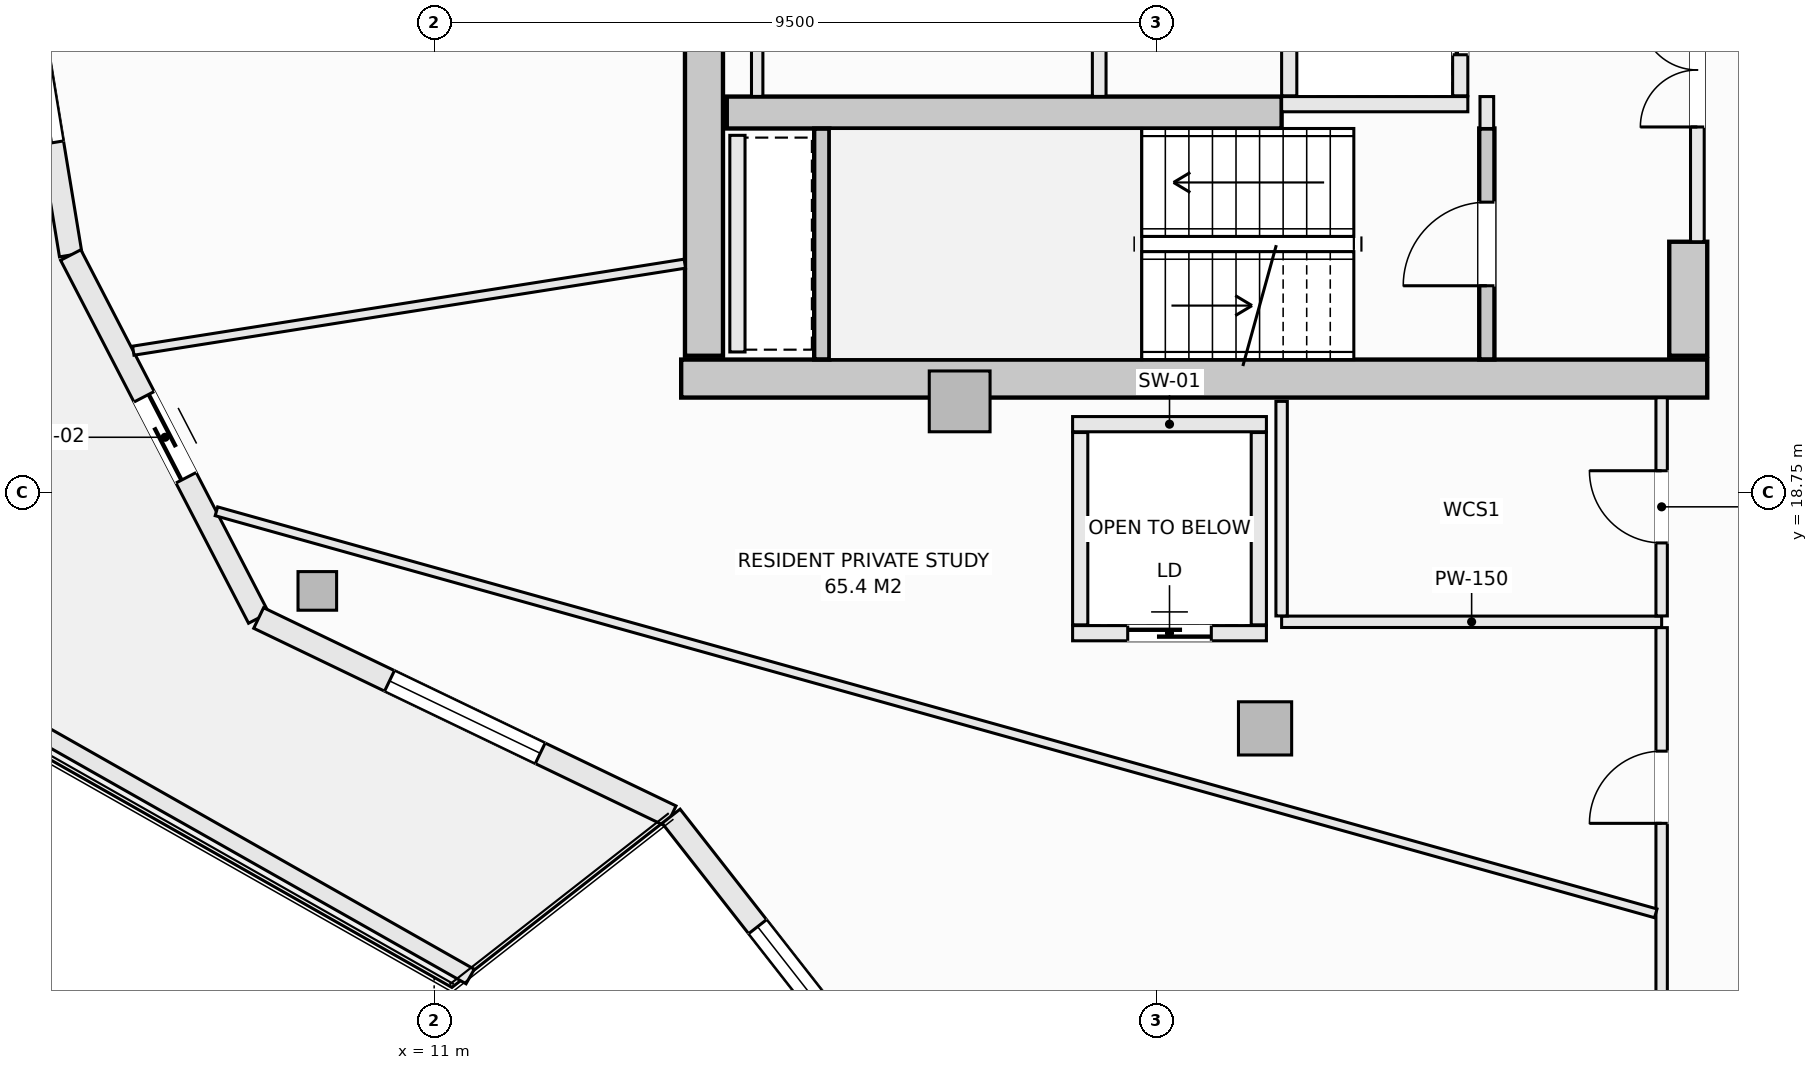
"""IFC4 building model, lengths in metres.
Left out: names, types, materials, properties, quantities, classifications, styles, units other than length and angle.
Written with IfcOpenShell. Run it as: python <this file> out.ifc"""

import sys

from ifc_helpers import new_model, si_unit, direction, frame, frame_2d, origin, origin_2d, place, context, subcontext, project, spatial, rectangle, hollow_rectangle, extrude, element, fill, save


model = new_model("IFC4")
c1 = context("Model", 3, precision=1e-05, world=origin(), true_north=direction((0.0, 1.0)))
c2 = subcontext(c1, "Body", "Model", "MODEL_VIEW")
j1 = project(units=[si_unit("LENGTHUNIT", "METRE"), si_unit("PLANEANGLEUNIT", "RADIAN")], contexts=[c1])
p1 = place(None, origin())
s1 = spatial("IfcSite", under=j1, at=p1, CompositionType="ELEMENT")
p2 = place(p1, origin())
s2 = spatial("IfcBuilding", under=s1, at=p2, CompositionType="ELEMENT")
p3 = place(p2, frame((0.0, 0.0, 222.8)))
s3 = spatial("IfcBuildingStorey", under=s2, at=p3, CompositionType="ELEMENT", Elevation=222.8)
p4 = place(p3, frame((14.25, 20.25, -0.27), z_axis=(0.0, 0.0, 1.0), x_axis=(1.0, 0.0, 0.0)))
e1 = element("IfcWall", 1, at=p4, inside=s3, PredefinedType="SHEAR", context=c2, shape_type="SweptSolid", body=[
    extrude(rectangle(XDim=13.5, YDim=0.5, at=frame_2d((6.75, 0.0))), origin(), (0.0, 0.0, 1.0), 3.3),
])
p5 = place(p3, frame((14.55, 20.55, -0.27), z_axis=(0.0, 0.0, 1.0), x_axis=(0.0, 1.0, 0.0)))
e2 = element("IfcWall", 2, at=p5, inside=s3, PredefinedType="SHEAR", context=c2, shape_type="SweptSolid", body=[
    extrude(rectangle(XDim=12.9, YDim=0.5, at=frame_2d((6.45, 0.0))), origin(), (0.0, 0.0, 1.0), 3.3),
])
p6 = place(p3, frame((27.5, 20.55, -0.27), z_axis=(0.0, 0.0, 1.0), x_axis=(0.0, 1.0, 0.0)))
e3 = element("IfcWall", 3, at=p6, inside=s3, PredefinedType="SHEAR", context=c2, shape_type="SweptSolid", body=[
    extrude(rectangle(XDim=1.5, YDim=0.5, at=frame_2d((0.75, 0.0))), origin(), (0.0, 0.0, 1.0), 3.3),
])
p7 = place(p3, frame((14.85, 23.75, -0.27), z_axis=(0.0, 0.0, 1.0), x_axis=(1.0, 0.0, 0.0)))
e4 = element("IfcWall", 4, at=p7, inside=s3, PredefinedType="SHEAR", context=c2, shape_type="SweptSolid", body=[
    extrude(rectangle(XDim=7.3, YDim=0.42, at=frame_2d((3.65, 0.0))), origin(), (0.0, 0.0, 1.0), 3.3),
])
p8 = place(p3, frame((9.463, 17.456, -0.27), z_axis=(0.0, 0.0, 1.0), x_axis=(1.0, 0.0, 0.0)))
e5 = element("IfcColumn", 5, at=p8, inside=s3, PredefinedType="COLUMN", context=c2, shape_type="SweptSolid", body=[
    extrude(hollow_rectangle(XDim=0.508, YDim=0.508, WallThickness=0.019, at=origin_2d()), origin(), (0.0, 0.0, 1.0), 3.3),
])
p9 = place(p3, frame((21.932, 15.648, -0.27), z_axis=(0.0, 0.0, 1.0), x_axis=(1.0, 0.0, 0.0)))
e6 = element("IfcColumn", 6, at=p9, inside=s3, PredefinedType="COLUMN", context=c2, shape_type="SweptSolid", body=[
    extrude(rectangle(XDim=0.7, YDim=0.7, at=origin_2d()), origin(), (0.0, 0.0, 1.0), 3.3),
])
p10 = place(p3, frame((17.914, 19.95, -0.27), z_axis=(0.0, 0.0, 1.0), x_axis=(1.0, 0.0, 0.0)))
e7 = element("IfcColumn", 7, at=p10, inside=s3, PredefinedType="PILASTER", context=c2, shape_type="SweptSolid", body=[
    extrude(rectangle(XDim=0.8, YDim=0.8, at=origin_2d()), origin(), (0.0, 0.0, 1.0), 3.3),
])
p11 = place(p3, frame((5.375, 27.0, 0.0), z_axis=(0.0, 0.0, 1.0), x_axis=(0.16237087798, -0.986729799886, 0.0)))
e8 = element("IfcWall", 8, at=p11, inside=s3, PredefinedType="SOLIDWALL", context=c2, shape_type="SweptSolid", body=[
    extrude(rectangle(XDim=5.193, YDim=0.3, at=frame_2d((2.597, 0.0))), origin(), (0.0, 0.0, 1.0), 2.605),
])
p12 = place(p11, frame((1.497, 0.0, 0.72)))
e9 = element("IfcOpeningElement", 9, at=p12, cuts=e8, PredefinedType="OPENING", context=c2, shape_type="SweptSolid", body=[
    extrude(rectangle(XDim=2.2, YDim=1.65, at=frame_2d((1.1, 0.825))), frame((0.0, 0.16, 0.0), z_axis=(0.0, -1.0, 0.0), x_axis=(1.0, 0.0, 0.0)), (0.0, 0.0, 1.0), 0.32),
])
p13 = place(p3, frame((6.218, 21.875, 0.0), z_axis=(0.0, 0.0, 1.0), x_axis=(0.459808219482, -0.888018243786, 0.0)))
e10 = element("IfcWall", 10, at=p13, inside=s3, PredefinedType="SOLIDWALL", context=c2, shape_type="SweptSolid", body=[
    extrude(rectangle(XDim=5.378, YDim=0.3, at=frame_2d((2.689, 0.0))), origin(), (0.0, 0.0, 1.0), 2.605),
])
p14 = place(p13, frame((2.1, 0.0, 0.0)))
e11 = element("IfcOpeningElement", 11, at=p14, cuts=e10, PredefinedType="OPENING", context=c2, shape_type="SweptSolid", body=[
    extrude(rectangle(XDim=1.2, YDim=2.2, at=frame_2d((0.6, 1.1))), frame((0.0, 0.16, 0.0), z_axis=(0.0, -1.0, 0.0), x_axis=(1.0, 0.0, 0.0)), (0.0, 0.0, 1.0), 0.32),
])
p15 = place(p3, frame((8.691, 17.1, 0.0), z_axis=(0.0, 0.0, 1.0), x_axis=(0.901348331142, -0.433094892545, 0.0)))
e12 = element("IfcWall", 12, at=p15, inside=s3, PredefinedType="SOLIDWALL", context=c2, shape_type="SweptSolid", body=[
    extrude(rectangle(XDim=6.021, YDim=0.3, at=frame_2d((3.01, 0.0))), origin(), (0.0, 0.0, 1.0), 2.605),
])
p16 = place(p15, frame((1.91, 0.0, 0.72)))
e13 = element("IfcOpeningElement", 13, at=p16, cuts=e12, PredefinedType="OPENING", context=c2, shape_type="SweptSolid", body=[
    extrude(rectangle(XDim=2.2, YDim=1.65, at=frame_2d((1.1, 0.825))), frame((0.0, 0.16, 0.0), z_axis=(0.0, -1.0, 0.0), x_axis=(1.0, 0.0, 0.0)), (0.0, 0.0, 1.0), 0.32),
])
p17 = place(p3, frame((14.117, 14.493, 0.0), z_axis=(0.0, 0.0, 1.0), x_axis=(0.616450126935, -0.787393955401, 0.0)))
e14 = element("IfcWall", 14, at=p17, inside=s3, PredefinedType="SOLIDWALL", context=c2, shape_type="SweptSolid", body=[
    extrude(rectangle(XDim=5.893, YDim=0.3, at=frame_2d((2.946, 0.0))), origin(), (0.0, 0.0, 1.0), 2.605),
])
p18 = place(p17, frame((1.846, 0.0, 0.72)))
e15 = element("IfcOpeningElement", 15, at=p18, cuts=e14, PredefinedType="OPENING", context=c2, shape_type="SweptSolid", body=[
    extrude(rectangle(XDim=2.2, YDim=1.65, at=frame_2d((1.1, 0.825))), frame((0.0, 0.16, 0.0), z_axis=(0.0, -1.0, 0.0), x_axis=(1.0, 0.0, 0.0)), (0.0, 0.0, 1.0), 0.32),
])
p19 = place(p3, frame((5.608, 15.709, 0.0), z_axis=(0.0, 0.0, 1.0), x_axis=(0.869860619267, -0.493297580623, 0.0)))
e16 = element("IfcWall", 16, at=p19, inside=s3, PredefinedType="PARAPET", context=c2, shape_type="SweptSolid", body=[
    extrude(rectangle(XDim=6.743, YDim=0.22, at=frame_2d((3.371, 0.0))), origin(), (0.0, 0.0, 1.0), 0.52),
])
p20 = place(p3, frame((24.85, 20.502, -0.27), z_axis=(0.0, 0.0, 1.0), x_axis=(0.0, 1.0, 0.0)))
e17 = element("IfcWall", 17, at=p20, inside=s3, PredefinedType="SHEAR", context=c2, shape_type="SweptSolid", body=[
    extrude(rectangle(XDim=3.038, YDim=0.2, at=frame_2d((1.519, 0.0))), origin(), (0.0, 0.0, 1.0), 3.3),
])
p21 = place(p20, frame((0.969, 0.0, 0.27)))
e18 = element("IfcOpeningElement", 18, at=p21, cuts=e17, PredefinedType="OPENING", context=c2, shape_type="SweptSolid", body=[
    extrude(rectangle(XDim=1.1, YDim=2.15, at=frame_2d((0.55, 1.075))), frame((0.0, 0.11, 0.0), z_axis=(0.0, -1.0, 0.0), x_axis=(1.0, 0.0, 0.0)), (0.0, 0.0, 1.0), 0.22),
])
p22 = place(p3, frame((16.1, 20.502, -0.27), z_axis=(0.0, 0.0, 1.0), x_axis=(0.0, 1.0, 0.0)))
e19 = element("IfcWall", 19, at=p22, inside=s3, PredefinedType="SHEAR", context=c2, shape_type="SweptSolid", body=[
    extrude(rectangle(XDim=3.036, YDim=0.2, at=frame_2d((1.518, 0.0))), origin(), (0.0, 0.0, 1.0), 3.3),
])
p23 = place(p3, frame((22.15, 23.86, 0.0), z_axis=(0.0, 0.0, 1.0), x_axis=(1.0, 0.0, 0.0)))
e20 = element("IfcWall", 20, at=p23, inside=s3, PredefinedType="SOLIDWALL", context=c2, shape_type="SweptSolid", body=[
    extrude(rectangle(XDim=2.45, YDim=0.2, at=frame_2d((1.225, 0.0))), origin(), (0.0, 0.0, 1.0), 3.03),
])
p24 = place(p3, frame((22.25, 23.97, 0.0), z_axis=(0.0, 0.0, 1.0), x_axis=(0.0, 1.0, 0.0)))
e21 = element("IfcWall", 21, at=p24, inside=s3, PredefinedType="SOLIDWALL", context=c2, shape_type="SweptSolid", body=[
    extrude(rectangle(XDim=2.18, YDim=0.2, at=frame_2d((1.09, 0.0))), origin(), (0.0, 0.0, 1.0), 3.03),
])
p25 = place(p3, frame((24.5, 23.97, 0.0), z_axis=(0.0, 0.0, 1.0), x_axis=(0.0, 1.0, 0.0)))
e22 = element("IfcWall", 22, at=p25, inside=s3, PredefinedType="SOLIDWALL", context=c2, shape_type="SweptSolid", body=[
    extrude(rectangle(XDim=2.18, YDim=0.2, at=frame_2d((1.09, 0.0))), origin(), (0.0, 0.0, 1.0), 3.03),
])
p26 = place(p25, frame((0.54, 0.0, 0.0)))
e23 = element("IfcOpeningElement", 23, at=p26, cuts=e22, PredefinedType="OPENING", context=c2, shape_type="SweptSolid", body=[
    extrude(rectangle(XDim=1.1, YDim=2.2, at=frame_2d((0.55, 1.1))), frame((0.0, 0.11, 0.0), z_axis=(0.0, -1.0, 0.0), x_axis=(1.0, 0.0, 0.0)), (0.0, 0.0, 1.0), 0.22),
])
p27 = place(p3, frame((19.4, 19.65, 0.0), z_axis=(0.0, 0.0, 1.0), x_axis=(1.0, 0.0, 0.0)))
e24 = element("IfcWall", 24, at=p27, inside=s3, PredefinedType="SOLIDWALL", context=c2, shape_type="SweptSolid", body=[
    extrude(rectangle(XDim=2.55, YDim=0.2, at=frame_2d((1.275, 0.0))), origin(), (0.0, 0.0, 1.0), 3.03),
])
p28 = place(p3, frame((19.4, 16.9, 0.0), z_axis=(0.0, 0.0, 1.0), x_axis=(1.0, 0.0, 0.0)))
e25 = element("IfcWall", 25, at=p28, inside=s3, PredefinedType="SOLIDWALL", context=c2, shape_type="SweptSolid", body=[
    extrude(rectangle(XDim=2.55, YDim=0.2, at=frame_2d((1.275, 0.0))), origin(), (0.0, 0.0, 1.0), 3.03),
])
p29 = place(p28, frame((0.725, 0.0, 0.0)))
e26 = element("IfcOpeningElement", 26, at=p29, cuts=e25, PredefinedType="OPENING", context=c2, shape_type="SweptSolid", body=[
    extrude(rectangle(XDim=1.1, YDim=2.2, at=frame_2d((0.55, 1.1))), frame((0.0, 0.11, 0.0), z_axis=(0.0, -1.0, 0.0), x_axis=(1.0, 0.0, 0.0)), (0.0, 0.0, 1.0), 0.22),
])
for number, where, z_axis, x_axis in (
    (27, (19.5, 17.01, 0.0), (0.0, 0.0, 1.0), (0.0, 1.0, 0.0)),
    (28, (21.85, 17.01, 0.0), (0.0, 0.0, 1.0), (0.0, 1.0, 0.0)),
):
    element("IfcWall", number, at=place(p3, frame(where, z_axis=z_axis, x_axis=x_axis)), inside=s3, PredefinedType="SOLIDWALL", context=c2, shape_type="SweptSolid", body=[
        extrude(rectangle(XDim=2.53, YDim=0.2, at=frame_2d((1.265, 0.0))), origin(), (0.0, 0.0, 1.0), 3.03),
    ])
p30 = place(p3, frame((14.99, 20.6, 0.0), z_axis=(0.0, 0.0, 1.0), x_axis=(0.0, 1.0, 0.0)))
e29 = element("IfcWall", 29, at=p30, inside=s3, PredefinedType="SOLIDWALL", context=c2, shape_type="SweptSolid", body=[
    extrude(rectangle(XDim=2.85, YDim=0.2, at=frame_2d((1.425, 0.0))), origin(), (0.0, 0.0, 1.0), 3.03),
])
p31 = place(p3, frame((24.85, 23.54, 0.0), z_axis=(0.0, 0.0, 1.0), x_axis=(0.0, 1.0, 0.0)))
e30 = element("IfcWall", 30, at=p31, inside=s3, PredefinedType="SOLIDWALL", context=c2, shape_type="SweptSolid", body=[
    extrude(rectangle(XDim=0.42, YDim=0.18, at=frame_2d((0.21, 0.0))), origin(), (0.0, 0.0, 1.0), 3.03),
])
p32 = place(p3, frame((27.62, 22.05, 0.0), z_axis=(0.0, 0.0, 1.0), x_axis=(0.0, 1.0, 0.0)))
e31 = element("IfcWall", 31, at=p32, inside=s3, PredefinedType="SOLIDWALL", context=c2, shape_type="SweptSolid", body=[
    extrude(rectangle(XDim=9.9, YDim=0.18, at=frame_2d((4.95, 0.0))), origin(), (0.0, 0.0, 1.0), 3.03),
])
p33 = place(p32, frame((4.475, 0.0, 0.0)))
e32 = element("IfcOpeningElement", 32, at=p33, cuts=e31, PredefinedType="OPENING", context=c2, shape_type="SweptSolid", body=[
    extrude(rectangle(XDim=0.95, YDim=2.1, at=frame_2d((0.475, 1.05))), frame((0.0, 0.1, 0.0), z_axis=(0.0, -1.0, 0.0), x_axis=(1.0, 0.0, 0.0)), (0.0, 0.0, 1.0), 0.2),
])
p34 = place(p32, frame((6.89, 0.0, 0.0)))
e33 = element("IfcOpeningElement", 33, at=p34, cuts=e31, PredefinedType="OPENING", context=c2, shape_type="SweptSolid", body=[
    extrude(rectangle(XDim=1.5, YDim=2.2, at=frame_2d((0.75, 1.1))), frame((0.0, 0.1, 0.0), z_axis=(0.0, -1.0, 0.0), x_axis=(1.0, 0.0, 0.0)), (0.0, 0.0, 1.0), 0.2),
])
p35 = place(p32, frame((1.51, 0.0, 0.0)))
e34 = element("IfcOpeningElement", 34, at=p35, cuts=e31, PredefinedType="OPENING", context=c2, shape_type="SweptSolid", body=[
    extrude(rectangle(XDim=1.5, YDim=2.2, at=frame_2d((0.75, 1.1))), frame((0.0, 0.1, 0.0), z_axis=(0.0, -1.0, 0.0), x_axis=(1.0, 0.0, 0.0)), (0.0, 0.0, 1.0), 0.2),
])
p36 = place(p3, frame((15.25, 23.962, 0.0), z_axis=(0.0, 0.0, 1.0), x_axis=(0.0, 1.0, 0.0)))
e35 = element("IfcWall", 35, at=p36, inside=s3, PredefinedType="PARTITIONING", context=c2, shape_type="SweptSolid", body=[
    extrude(rectangle(XDim=2.106, YDim=0.15, at=frame_2d((1.053, 0.0))), origin(), (0.0, 0.0, 1.0), 3.03),
])
p37 = place(p3, frame((19.75, 23.962, 0.0), z_axis=(0.0, 0.0, 1.0), x_axis=(0.0, 1.0, 0.0)))
e36 = element("IfcWall", 36, at=p37, inside=s3, PredefinedType="SOLIDWALL", context=c2, shape_type="SweptSolid", body=[
    extrude(rectangle(XDim=2.106, YDim=0.18, at=frame_2d((1.053, 0.0))), origin(), (0.0, 0.0, 1.0), 3.03),
])
p38 = place(p3, frame((22.15, 17.05, 0.0), z_axis=(0.0, 0.0, 1.0), x_axis=(1.0, 0.0, 0.0)))
e37 = element("IfcWall", 37, at=p38, inside=s3, PredefinedType="PARTITIONING", context=c2, shape_type="SweptSolid", body=[
    extrude(rectangle(XDim=5.0, YDim=0.15, at=frame_2d((2.5, 0.0))), origin(), (0.0, 0.0, 1.0), 3.03),
])
p39 = place(p3, frame((22.15, 17.127, 0.0), z_axis=(0.0, 0.0, 1.0), x_axis=(0.0, 1.0, 0.0)))
e38 = element("IfcWall", 38, at=p39, inside=s3, PredefinedType="PARTITIONING", context=c2, shape_type="SweptSolid", body=[
    extrude(rectangle(XDim=2.823, YDim=0.15, at=frame_2d((1.412, 0.0))), origin(), (0.0, 0.0, 1.0), 3.03),
])
p40 = place(p3, frame((27.15, 11.75, 0.0), z_axis=(0.0, 0.0, 1.0), x_axis=(0.0, 1.0, 0.0)))
e39 = element("IfcWall", 39, at=p40, inside=s3, PredefinedType="PARTITIONING", context=c2, shape_type="SweptSolid", body=[
    extrude(rectangle(XDim=5.223, YDim=0.15, at=frame_2d((2.611, 0.0))), origin(), (0.0, 0.0, 1.0), 3.03),
])
p41 = place(p40, frame((2.648, 0.0, 0.0)))
e40 = element("IfcOpeningElement", 40, at=p41, cuts=e39, PredefinedType="OPENING", context=c2, shape_type="SweptSolid", body=[
    extrude(rectangle(XDim=0.95, YDim=2.1, at=frame_2d((0.475, 1.05))), frame((0.0, 0.085, 0.0), z_axis=(0.0, -1.0, 0.0), x_axis=(1.0, 0.0, 0.0)), (0.0, 0.0, 1.0), 0.17),
])
p42 = place(p3, frame((27.15, 17.127, 0.0), z_axis=(0.0, 0.0, 1.0), x_axis=(0.0, 1.0, 0.0)))
e41 = element("IfcWall", 41, at=p42, inside=s3, PredefinedType="PARTITIONING", context=c2, shape_type="SweptSolid", body=[
    extrude(rectangle(XDim=2.871, YDim=0.15, at=frame_2d((1.436, 0.0))), origin(), (0.0, 0.0, 1.0), 3.03),
])
p43 = place(p42, frame((0.96, 0.0, 0.0)))
e42 = element("IfcOpeningElement", 42, at=p43, cuts=e41, PredefinedType="OPENING", context=c2, shape_type="SweptSolid", body=[
    extrude(rectangle(XDim=0.95, YDim=2.1, at=frame_2d((0.475, 1.05))), frame((0.0, 0.085, 0.0), z_axis=(0.0, -1.0, 0.0), x_axis=(1.0, 0.0, 0.0)), (0.0, 0.0, 1.0), 0.17),
])
p44 = place(p3, frame((7.041, 20.617, 0.0), z_axis=(0.0, 0.0, 1.0), x_axis=(0.987780472541, 0.155851654036, 0.0)))
e43 = element("IfcWall", 43, at=p44, inside=s3, PredefinedType="PARTITIONING", context=c2, shape_type="SweptSolid", body=[
    extrude(rectangle(XDim=7.347, YDim=0.12, at=frame_2d((3.673, 0.0))), origin(), (0.0, 0.0, 1.0), 3.03),
])
p45 = place(p3, frame((8.135, 18.504, 0.0), z_axis=(0.0, 0.0, 1.0), x_axis=(0.963142154711, -0.268992917785, 0.0)))
e44 = element("IfcWall", 44, at=p45, inside=s3, PredefinedType="PARTITIONING", context=c2, shape_type="SweptSolid", body=[
    extrude(rectangle(XDim=19.662, YDim=0.12, at=frame_2d((9.831, 0.0))), origin(), (0.0, 0.0, 1.0), 2.77),
])
p46 = place(p12, origin())
e45 = element("IfcWindow", 45, at=p46, inside=s3, PartitioningType="SINGLE_PANEL", PredefinedType="WINDOW", context=c2, shape_type="SweptSolid", body=[
    extrude(rectangle(XDim=2.2, YDim=1.65, at=frame_2d((1.1, 0.825))), frame((0.0, 0.03, 0.0), z_axis=(0.0, -1.0, 0.0), x_axis=(1.0, 0.0, 0.0)), (0.0, 0.0, 1.0), 0.06),
])
fill(e9, e45)
p47 = place(p14, frame((1.2, 0.0, 0.0), z_axis=(0.0, 0.0, 1.0), x_axis=(-1.0, 0.0, 0.0)))
e46 = element("IfcDoor", 46, at=p47, inside=s3, OperationType="SLIDING_TO_LEFT", PredefinedType="DOOR", context=c2, shape_type="SweptSolid", body=[
    extrude(rectangle(XDim=1.2, YDim=2.2, at=frame_2d((0.6, 1.1))), frame((0.0, 0.025, 0.0), z_axis=(0.0, -1.0, 0.0), x_axis=(1.0, 0.0, 0.0)), (0.0, 0.0, 1.0), 0.05),
])
fill(e11, e46)
p48 = place(p16, origin())
e47 = element("IfcWindow", 47, at=p48, inside=s3, PartitioningType="SINGLE_PANEL", PredefinedType="WINDOW", context=c2, shape_type="SweptSolid", body=[
    extrude(rectangle(XDim=2.2, YDim=1.65, at=frame_2d((1.1, 0.825))), frame((0.0, 0.03, 0.0), z_axis=(0.0, -1.0, 0.0), x_axis=(1.0, 0.0, 0.0)), (0.0, 0.0, 1.0), 0.06),
])
fill(e13, e47)
p49 = place(p18, origin())
e48 = element("IfcWindow", 48, at=p49, inside=s3, PartitioningType="SINGLE_PANEL", PredefinedType="WINDOW", context=c2, shape_type="SweptSolid", body=[
    extrude(rectangle(XDim=2.2, YDim=1.65, at=frame_2d((1.1, 0.825))), frame((0.0, 0.03, 0.0), z_axis=(0.0, -1.0, 0.0), x_axis=(1.0, 0.0, 0.0)), (0.0, 0.0, 1.0), 0.06),
])
fill(e15, e48)
p50 = place(p21, origin())
e49 = element("IfcDoor", 49, at=p50, inside=s3, OperationType="SINGLE_SWING_LEFT", PredefinedType="DOOR", context=c2, shape_type="SweptSolid", body=[
    extrude(rectangle(XDim=1.1, YDim=2.15, at=frame_2d((0.55, 1.075))), frame((0.0, 0.025, 0.0), z_axis=(0.0, -1.0, 0.0), x_axis=(1.0, 0.0, 0.0)), (0.0, 0.0, 1.0), 0.05),
])
fill(e18, e49)
p51 = place(p26, origin())
e50 = element("IfcDoor", 50, at=p51, inside=s3, OperationType="SLIDING_TO_LEFT", PredefinedType="DOOR", context=c2, shape_type="SweptSolid", body=[
    extrude(rectangle(XDim=1.1, YDim=2.2, at=frame_2d((0.55, 1.1))), frame((0.0, 0.025, 0.0), z_axis=(0.0, -1.0, 0.0), x_axis=(1.0, 0.0, 0.0)), (0.0, 0.0, 1.0), 0.05),
])
fill(e23, e50)
p52 = place(p29, origin())
e51 = element("IfcDoor", 51, at=p52, inside=s3, OperationType="SLIDING_TO_LEFT", PredefinedType="DOOR", context=c2, shape_type="SweptSolid", body=[
    extrude(rectangle(XDim=1.1, YDim=2.2, at=frame_2d((0.55, 1.1))), frame((0.0, 0.025, 0.0), z_axis=(0.0, -1.0, 0.0), x_axis=(1.0, 0.0, 0.0)), (0.0, 0.0, 1.0), 0.05),
])
fill(e26, e51)
p53 = place(p35, origin())
e52 = element("IfcDoor", 52, at=p53, inside=s3, OperationType="DOUBLE_DOOR_SINGLE_SWING", PredefinedType="DOOR", context=c2, shape_type="SweptSolid", body=[
    extrude(rectangle(XDim=1.5, YDim=2.2, at=frame_2d((0.75, 1.1))), frame((0.0, 0.025, 0.0), z_axis=(0.0, -1.0, 0.0), x_axis=(1.0, 0.0, 0.0)), (0.0, 0.0, 1.0), 0.05),
])
fill(e34, e52)
p54 = place(p43, origin())
e53 = element("IfcDoor", 53, at=p54, inside=s3, OperationType="SINGLE_SWING_RIGHT", PredefinedType="DOOR", context=c2, shape_type="SweptSolid", body=[
    extrude(rectangle(XDim=0.95, YDim=2.1, at=frame_2d((0.475, 1.05))), frame((0.0, 0.025, 0.0), z_axis=(0.0, -1.0, 0.0), x_axis=(1.0, 0.0, 0.0)), (0.0, 0.0, 1.0), 0.05),
])
fill(e42, e53)
p55 = place(p41, origin())
e54 = element("IfcDoor", 54, at=p55, inside=s3, OperationType="SINGLE_SWING_LEFT", PredefinedType="DOOR", context=c2, shape_type="SweptSolid", body=[
    extrude(rectangle(XDim=0.95, YDim=2.1, at=frame_2d((0.475, 1.05))), frame((0.0, 0.025, 0.0), z_axis=(0.0, -1.0, 0.0), x_axis=(1.0, 0.0, 0.0)), (0.0, 0.0, 1.0), 0.05),
])
fill(e40, e54)
save(model, sys.argv[1])
